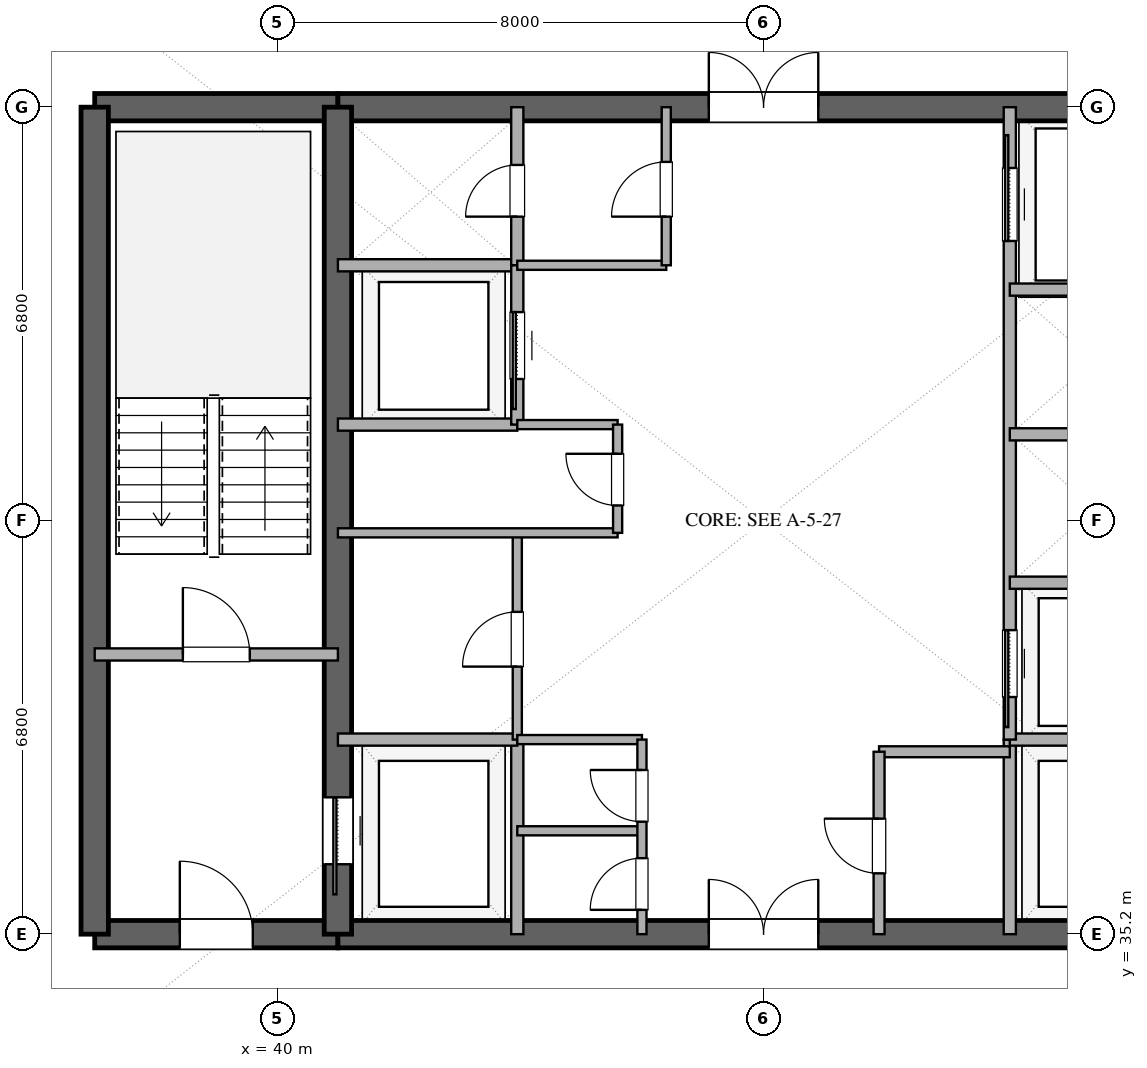
"""IFC4 building model, lengths in metres.
Left out: names, types, materials, properties, quantities, classifications, styles, units other than length and angle.
Written with IfcOpenShell. Run it as: python <this file> out.ifc"""

import sys

from ifc_helpers import new_model, si_unit, direction, frame, frame_2d, origin, place, context, subcontext, project, spatial, rectangle, extrude, element, fill, save


model = new_model("IFC4")
c1 = context("Model", 3, precision=1e-05, world=origin(), true_north=direction((0.0, 1.0)))
c2 = subcontext(c1, "Body", "Model", "MODEL_VIEW")
j1 = project(units=[si_unit("LENGTHUNIT", "METRE"), si_unit("PLANEANGLEUNIT", "RADIAN")], contexts=[c1])
p1 = place(None, origin())
s1 = spatial("IfcSite", under=j1, at=p1, CompositionType="ELEMENT")
p2 = place(p1, origin())
s2 = spatial("IfcBuilding", under=s1, at=p2, CompositionType="ELEMENT")
p3 = place(p2, frame((0.0, 0.0, 175.8)))
s3 = spatial("IfcBuildingStorey", under=s2, at=p3, CompositionType="ELEMENT", Elevation=175.8)
p4 = place(p3, frame((37.0, 35.2, 0.0), z_axis=(0.0, 0.0, 1.0), x_axis=(1.0, 0.0, 0.0)))
e1 = element("IfcWall", 1, at=p4, inside=s3, PredefinedType="SHEAR", context=c2, shape_type="SweptSolid", body=[
    extrude(rectangle(XDim=4.0, YDim=0.45, at=frame_2d((2.0, 0.0))), origin(), (0.0, 0.0, 1.0), 3.38),
])
p5 = place(p4, frame((1.4, 0.0, 0.0)))
e2 = element("IfcOpeningElement", 2, at=p5, cuts=e1, PredefinedType="OPENING", context=c2, shape_type="SweptSolid", body=[
    extrude(rectangle(XDim=1.2, YDim=2.15, at=frame_2d((0.6, 1.075))), frame((0.0, 0.235, 0.0), z_axis=(0.0, -1.0, 0.0), x_axis=(1.0, 0.0, 0.0)), (0.0, 0.0, 1.0), 0.47),
])
p6 = place(p3, frame((41.0, 35.2, 0.0), z_axis=(0.0, 0.0, 1.0), x_axis=(1.0, 0.0, 0.0)))
e3 = element("IfcWall", 3, at=p6, inside=s3, PredefinedType="SHEAR", context=c2, shape_type="SweptSolid", body=[
    extrude(rectangle(XDim=14.0, YDim=0.45, at=frame_2d((7.0, 0.0))), origin(), (0.0, 0.0, 1.0), 3.38),
])
p7 = place(p6, frame((6.1, 0.0, 0.0)))
e4 = element("IfcOpeningElement", 4, at=p7, cuts=e3, PredefinedType="OPENING", context=c2, shape_type="SweptSolid", body=[
    extrude(rectangle(XDim=1.8, YDim=2.25, at=frame_2d((0.9, 1.125))), frame((0.0, 0.235, 0.0), z_axis=(0.0, -1.0, 0.0), x_axis=(1.0, 0.0, 0.0)), (0.0, 0.0, 1.0), 0.47),
])
p8 = place(p3, frame((37.0, 48.8, 0.0), z_axis=(0.0, 0.0, 1.0), x_axis=(1.0, 0.0, 0.0)))
e5 = element("IfcWall", 5, at=p8, inside=s3, PredefinedType="SHEAR", context=c2, shape_type="SweptSolid", body=[
    extrude(rectangle(XDim=4.0, YDim=0.45, at=frame_2d((2.0, 0.0))), origin(), (0.0, 0.0, 1.0), 3.38),
])
p9 = place(p3, frame((41.0, 48.8, 0.0), z_axis=(0.0, 0.0, 1.0), x_axis=(1.0, 0.0, 0.0)))
e6 = element("IfcWall", 6, at=p9, inside=s3, PredefinedType="SHEAR", context=c2, shape_type="SweptSolid", body=[
    extrude(rectangle(XDim=14.0, YDim=0.45, at=frame_2d((7.0, 0.0))), origin(), (0.0, 0.0, 1.0), 3.38),
])
p10 = place(p9, frame((6.1, 0.0, 0.0)))
e7 = element("IfcOpeningElement", 7, at=p10, cuts=e6, PredefinedType="OPENING", context=c2, shape_type="SweptSolid", body=[
    extrude(rectangle(XDim=1.8, YDim=2.25, at=frame_2d((0.9, 1.125))), frame((0.0, 0.235, 0.0), z_axis=(0.0, -1.0, 0.0), x_axis=(1.0, 0.0, 0.0)), (0.0, 0.0, 1.0), 0.47),
])
p11 = place(p3, frame((37.0, 35.2, 0.0), z_axis=(0.0, 0.0, 1.0), x_axis=(0.0, 1.0, 0.0)))
e8 = element("IfcWall", 8, at=p11, inside=s3, PredefinedType="SHEAR", context=c2, shape_type="SweptSolid", body=[
    extrude(rectangle(XDim=13.6, YDim=0.45, at=frame_2d((6.8, 0.0))), origin(), (0.0, 0.0, 1.0), 3.38),
])
p12 = place(p3, frame((41.0, 35.2, 0.0), z_axis=(0.0, 0.0, 1.0), x_axis=(0.0, 1.0, 0.0)))
e9 = element("IfcWall", 9, at=p12, inside=s3, PredefinedType="SHEAR", context=c2, shape_type="SweptSolid", body=[
    extrude(rectangle(XDim=13.6, YDim=0.45, at=frame_2d((6.8, 0.0))), origin(), (0.0, 0.0, 1.0), 3.38),
])
p13 = place(p12, frame((1.15, 0.0, 0.0)))
e10 = element("IfcOpeningElement", 10, at=p13, cuts=e9, PredefinedType="OPENING", context=c2, shape_type="SweptSolid", body=[
    extrude(rectangle(XDim=1.1, YDim=2.2, at=frame_2d((0.55, 1.1))), frame((0.0, 0.235, 0.0), z_axis=(0.0, -1.0, 0.0), x_axis=(1.0, 0.0, 0.0)), (0.0, 0.0, 1.0), 0.47),
])
p14 = place(p3, frame((37.0, 39.8, 0.0), z_axis=(0.0, 0.0, 1.0), x_axis=(1.0, 0.0, 0.0)))
e11 = element("IfcWall", 11, at=p14, inside=s3, PredefinedType="SOLIDWALL", context=c2, shape_type="SweptSolid", body=[
    extrude(rectangle(XDim=4.0, YDim=0.2, at=frame_2d((2.0, 0.0))), origin(), (0.0, 0.0, 1.0), 2.74),
])
p15 = place(p14, frame((1.45, 0.0, 0.0)))
e12 = element("IfcOpeningElement", 12, at=p15, cuts=e11, PredefinedType="OPENING", context=c2, shape_type="SweptSolid", body=[
    extrude(rectangle(XDim=1.1, YDim=2.15, at=frame_2d((0.55, 1.075))), frame((0.0, 0.11, 0.0), z_axis=(0.0, -1.0, 0.0), x_axis=(1.0, 0.0, 0.0)), (0.0, 0.0, 1.0), 0.22),
])
p16 = place(p3, frame((43.95, 35.2, 0.0), z_axis=(0.0, 0.0, 1.0), x_axis=(0.0, 1.0, 0.0)))
e13 = element("IfcWall", 13, at=p16, inside=s3, PredefinedType="SOLIDWALL", context=c2, shape_type="SweptSolid", body=[
    extrude(rectangle(XDim=3.2, YDim=0.2, at=frame_2d((1.6, 0.0))), origin(), (0.0, 0.0, 1.0), 2.74),
])
p17 = place(p3, frame((41.0, 38.4, 0.0), z_axis=(0.0, 0.0, 1.0), x_axis=(1.0, 0.0, 0.0)))
e14 = element("IfcWall", 14, at=p17, inside=s3, PredefinedType="SOLIDWALL", context=c2, shape_type="SweptSolid", body=[
    extrude(rectangle(XDim=2.95, YDim=0.2, at=frame_2d((1.475, 0.0))), origin(), (0.0, 0.0, 1.0), 2.74),
])
p18 = place(p3, frame((52.05, 35.2, 0.0), z_axis=(0.0, 0.0, 1.0), x_axis=(0.0, 1.0, 0.0)))
e15 = element("IfcWall", 15, at=p18, inside=s3, PredefinedType="SOLIDWALL", context=c2, shape_type="SweptSolid", body=[
    extrude(rectangle(XDim=3.2, YDim=0.2, at=frame_2d((1.6, 0.0))), origin(), (0.0, 0.0, 1.0), 2.74),
])
for number, where, z_axis, x_axis in (
    (16, (52.05, 38.4, 0.0), (0.0, 0.0, 1.0), (1.0, 0.0, 0.0)),
    (17, (41.0, 46.2, 0.0), (0.0, 0.0, 1.0), (1.0, 0.0, 0.0)),
):
    element("IfcWall", number, at=place(p3, frame(where, z_axis=z_axis, x_axis=x_axis)), inside=s3, PredefinedType="SOLIDWALL", context=c2, shape_type="SweptSolid", body=[
        extrude(rectangle(XDim=2.95, YDim=0.2, at=frame_2d((1.475, 0.0))), origin(), (0.0, 0.0, 1.0), 2.74),
    ])
p19 = place(p3, frame((43.95, 46.2, 0.0), z_axis=(0.0, 0.0, 1.0), x_axis=(0.0, 1.0, 0.0)))
e18 = element("IfcWall", 18, at=p19, inside=s3, PredefinedType="SOLIDWALL", context=c2, shape_type="SweptSolid", body=[
    extrude(rectangle(XDim=2.6, YDim=0.2, at=frame_2d((1.3, 0.0))), origin(), (0.0, 0.0, 1.0), 2.74),
])
p20 = place(p19, frame((0.8, 0.0, 0.0)))
e19 = element("IfcOpeningElement", 19, at=p20, cuts=e18, PredefinedType="OPENING", context=c2, shape_type="SweptSolid", body=[
    extrude(rectangle(XDim=0.85, YDim=2.15, at=frame_2d((0.425, 1.075))), frame((0.0, 0.11, 0.0), z_axis=(0.0, -1.0, 0.0), x_axis=(1.0, 0.0, 0.0)), (0.0, 0.0, 1.0), 0.22),
])
p21 = place(p3, frame((41.0, 43.58, 0.0), z_axis=(0.0, 0.0, 1.0), x_axis=(1.0, 0.0, 0.0)))
e20 = element("IfcWall", 20, at=p21, inside=s3, PredefinedType="SOLIDWALL", context=c2, shape_type="SweptSolid", body=[
    extrude(rectangle(XDim=2.95, YDim=0.2, at=frame_2d((1.475, 0.0))), origin(), (0.0, 0.0, 1.0), 2.74),
])
p22 = place(p3, frame((43.95, 43.58, 0.0), z_axis=(0.0, 0.0, 1.0), x_axis=(0.0, 1.0, 0.0)))
e21 = element("IfcWall", 21, at=p22, inside=s3, PredefinedType="SOLIDWALL", context=c2, shape_type="SweptSolid", body=[
    extrude(rectangle(XDim=2.62, YDim=0.2, at=frame_2d((1.31, 0.0))), origin(), (0.0, 0.0, 1.0), 2.74),
])
p23 = place(p22, frame((0.75, 0.0, 0.0)))
e22 = element("IfcOpeningElement", 22, at=p23, cuts=e21, PredefinedType="OPENING", context=c2, shape_type="SweptSolid", body=[
    extrude(rectangle(XDim=1.1, YDim=2.2, at=frame_2d((0.55, 1.1))), frame((0.0, 0.11, 0.0), z_axis=(0.0, -1.0, 0.0), x_axis=(1.0, 0.0, 0.0)), (0.0, 0.0, 1.0), 0.22),
])
p24 = place(p3, frame((43.95, 38.4, 0.0), z_axis=(0.0, 0.0, 1.0), x_axis=(0.0, 1.0, 0.0)))
e23 = element("IfcWall", 23, at=p24, inside=s3, PredefinedType="PARTITIONING", context=c2, shape_type="SweptSolid", body=[
    extrude(rectangle(XDim=3.4, YDim=0.15, at=frame_2d((1.7, 0.0))), origin(), (0.0, 0.0, 1.0), 2.74),
])
p25 = place(p24, frame((1.2, 0.0, 0.0)))
e24 = element("IfcOpeningElement", 24, at=p25, cuts=e23, PredefinedType="OPENING", context=c2, shape_type="SweptSolid", body=[
    extrude(rectangle(XDim=0.9, YDim=2.15, at=frame_2d((0.45, 1.075))), frame((0.0, 0.085, 0.0), z_axis=(0.0, -1.0, 0.0), x_axis=(1.0, 0.0, 0.0)), (0.0, 0.0, 1.0), 0.17),
])
p26 = place(p3, frame((41.0, 41.8, 0.0), z_axis=(0.0, 0.0, 1.0), x_axis=(1.0, 0.0, 0.0)))
e25 = element("IfcWall", 25, at=p26, inside=s3, PredefinedType="PARTITIONING", context=c2, shape_type="SweptSolid", body=[
    extrude(rectangle(XDim=4.6, YDim=0.15, at=frame_2d((2.3, 0.0))), origin(), (0.0, 0.0, 1.0), 2.74),
])
p27 = place(p3, frame((43.95, 43.58, 0.0), z_axis=(0.0, 0.0, 1.0), x_axis=(1.0, 0.0, 0.0)))
e26 = element("IfcWall", 26, at=p27, inside=s3, PredefinedType="PARTITIONING", context=c2, shape_type="SweptSolid", body=[
    extrude(rectangle(XDim=1.65, YDim=0.15, at=frame_2d((0.825, 0.0))), origin(), (0.0, 0.0, 1.0), 2.74),
])
p28 = place(p3, frame((45.6, 41.8, 0.0), z_axis=(0.0, 0.0, 1.0), x_axis=(0.0, 1.0, 0.0)))
e27 = element("IfcWall", 27, at=p28, inside=s3, PredefinedType="PARTITIONING", context=c2, shape_type="SweptSolid", body=[
    extrude(rectangle(XDim=1.78, YDim=0.15, at=frame_2d((0.89, 0.0))), origin(), (0.0, 0.0, 1.0), 2.74),
])
p29 = place(p28, frame((0.45, 0.0, 0.0)))
e28 = element("IfcOpeningElement", 28, at=p29, cuts=e27, PredefinedType="OPENING", context=c2, shape_type="SweptSolid", body=[
    extrude(rectangle(XDim=0.85, YDim=2.15, at=frame_2d((0.425, 1.075))), frame((0.0, 0.085, 0.0), z_axis=(0.0, -1.0, 0.0), x_axis=(1.0, 0.0, 0.0)), (0.0, 0.0, 1.0), 0.17),
])
p30 = place(p3, frame((52.05, 38.4, 0.0), z_axis=(0.0, 0.0, 1.0), x_axis=(0.0, 1.0, 0.0)))
e29 = element("IfcWall", 29, at=p30, inside=s3, PredefinedType="SOLIDWALL", context=c2, shape_type="SweptSolid", body=[
    extrude(rectangle(XDim=10.4, YDim=0.2, at=frame_2d((5.2, 0.0))), origin(), (0.0, 0.0, 1.0), 2.74),
])
p31 = place(p30, frame((0.7, 0.0, 0.0)))
e30 = element("IfcOpeningElement", 30, at=p31, cuts=e29, PredefinedType="OPENING", context=c2, shape_type="SweptSolid", body=[
    extrude(rectangle(XDim=1.1, YDim=2.2, at=frame_2d((0.55, 1.1))), frame((0.0, 0.11, 0.0), z_axis=(0.0, -1.0, 0.0), x_axis=(1.0, 0.0, 0.0)), (0.0, 0.0, 1.0), 0.22),
])
p32 = place(p30, frame((8.2, 0.0, 0.0)))
e31 = element("IfcOpeningElement", 31, at=p32, cuts=e29, PredefinedType="OPENING", context=c2, shape_type="SweptSolid", body=[
    extrude(rectangle(XDim=1.2, YDim=2.2, at=frame_2d((0.6, 1.1))), frame((0.0, 0.11, 0.0), z_axis=(0.0, -1.0, 0.0), x_axis=(1.0, 0.0, 0.0)), (0.0, 0.0, 1.0), 0.22),
])
for number, where, z_axis, x_axis in (
    (32, (52.05, 40.98, 0.0), (0.0, 0.0, 1.0), (1.0, 0.0, 0.0)),
    (33, (52.05, 43.42, 0.0), (0.0, 0.0, 1.0), (1.0, 0.0, 0.0)),
    (34, (52.05, 45.8, 0.0), (0.0, 0.0, 1.0), (1.0, 0.0, 0.0)),
):
    element("IfcWall", number, at=place(p3, frame(where, z_axis=z_axis, x_axis=x_axis)), inside=s3, PredefinedType="SOLIDWALL", context=c2, shape_type="SweptSolid", body=[
        extrude(rectangle(XDim=2.95, YDim=0.2, at=frame_2d((1.475, 0.0))), origin(), (0.0, 0.0, 1.0), 2.74),
    ])
for number, where, z_axis, x_axis in (
    (35, (43.95, 36.9, 0.0), (0.0, 0.0, 1.0), (1.0, 0.0, 0.0)),
    (36, (43.95, 38.4, 0.0), (0.0, 0.0, 1.0), (1.0, 0.0, 0.0)),
):
    element("IfcWall", number, at=place(p3, frame(where, z_axis=z_axis, x_axis=x_axis)), inside=s3, PredefinedType="PARTITIONING", context=c2, shape_type="SweptSolid", body=[
        extrude(rectangle(XDim=2.05, YDim=0.15, at=frame_2d((1.025, 0.0))), origin(), (0.0, 0.0, 1.0), 2.74),
    ])
p33 = place(p3, frame((46.0, 35.2, 0.0), z_axis=(0.0, 0.0, 1.0), x_axis=(0.0, 1.0, 0.0)))
e37 = element("IfcWall", 37, at=p33, inside=s3, PredefinedType="PARTITIONING", context=c2, shape_type="SweptSolid", body=[
    extrude(rectangle(XDim=3.2, YDim=0.15, at=frame_2d((1.6, 0.0))), origin(), (0.0, 0.0, 1.0), 2.74),
])
p34 = place(p33, frame((0.4, 0.0, 0.0)))
e38 = element("IfcOpeningElement", 38, at=p34, cuts=e37, PredefinedType="OPENING", context=c2, shape_type="SweptSolid", body=[
    extrude(rectangle(XDim=0.85, YDim=2.15, at=frame_2d((0.425, 1.075))), frame((0.0, 0.085, 0.0), z_axis=(0.0, -1.0, 0.0), x_axis=(1.0, 0.0, 0.0)), (0.0, 0.0, 1.0), 0.17),
])
p35 = place(p33, frame((1.85, 0.0, 0.0)))
e39 = element("IfcOpeningElement", 39, at=p35, cuts=e37, PredefinedType="OPENING", context=c2, shape_type="SweptSolid", body=[
    extrude(rectangle(XDim=0.85, YDim=2.15, at=frame_2d((0.425, 1.075))), frame((0.0, 0.085, 0.0), z_axis=(0.0, -1.0, 0.0), x_axis=(1.0, 0.0, 0.0)), (0.0, 0.0, 1.0), 0.17),
])
p36 = place(p3, frame((43.95, 46.2, 0.0), z_axis=(0.0, 0.0, 1.0), x_axis=(1.0, 0.0, 0.0)))
e40 = element("IfcWall", 40, at=p36, inside=s3, PredefinedType="PARTITIONING", context=c2, shape_type="SweptSolid", body=[
    extrude(rectangle(XDim=2.45, YDim=0.15, at=frame_2d((1.225, 0.0))), origin(), (0.0, 0.0, 1.0), 2.74),
])
p37 = place(p3, frame((46.4, 46.2, 0.0), z_axis=(0.0, 0.0, 1.0), x_axis=(0.0, 1.0, 0.0)))
e41 = element("IfcWall", 41, at=p37, inside=s3, PredefinedType="PARTITIONING", context=c2, shape_type="SweptSolid", body=[
    extrude(rectangle(XDim=2.6, YDim=0.15, at=frame_2d((1.3, 0.0))), origin(), (0.0, 0.0, 1.0), 2.74),
])
p38 = place(p37, frame((0.8, 0.0, 0.0)))
e42 = element("IfcOpeningElement", 42, at=p38, cuts=e41, PredefinedType="OPENING", context=c2, shape_type="SweptSolid", body=[
    extrude(rectangle(XDim=0.9, YDim=2.15, at=frame_2d((0.45, 1.075))), frame((0.0, 0.085, 0.0), z_axis=(0.0, -1.0, 0.0), x_axis=(1.0, 0.0, 0.0)), (0.0, 0.0, 1.0), 0.17),
])
p39 = place(p3, frame((49.9, 38.2, 0.0), z_axis=(0.0, 0.0, 1.0), x_axis=(1.0, 0.0, 0.0)))
e43 = element("IfcWall", 43, at=p39, inside=s3, PredefinedType="PLUMBINGWALL", context=c2, shape_type="SweptSolid", body=[
    extrude(rectangle(XDim=2.15, YDim=0.18, at=frame_2d((1.075, 0.0))), origin(), (0.0, 0.0, 1.0), 2.74),
])
p40 = place(p3, frame((49.9, 35.2, 0.0), z_axis=(0.0, 0.0, 1.0), x_axis=(0.0, 1.0, 0.0)))
e44 = element("IfcWall", 44, at=p40, inside=s3, PredefinedType="PLUMBINGWALL", context=c2, shape_type="SweptSolid", body=[
    extrude(rectangle(XDim=3.0, YDim=0.18, at=frame_2d((1.5, 0.0))), origin(), (0.0, 0.0, 1.0), 2.74),
])
p41 = place(p40, frame((1.0, 0.0, 0.0)))
e45 = element("IfcOpeningElement", 45, at=p41, cuts=e44, PredefinedType="OPENING", context=c2, shape_type="SweptSolid", body=[
    extrude(rectangle(XDim=0.9, YDim=2.1, at=frame_2d((0.45, 1.05))), frame((0.0, 0.1, 0.0), z_axis=(0.0, -1.0, 0.0), x_axis=(1.0, 0.0, 0.0)), (0.0, 0.0, 1.0), 0.2),
])
p42 = place(p13, origin())
e46 = element("IfcDoor", 46, at=p42, inside=s3, OperationType="SLIDING_TO_LEFT", PredefinedType="DOOR", context=c2, shape_type="SweptSolid", body=[
    extrude(rectangle(XDim=1.1, YDim=2.2, at=frame_2d((0.55, 1.1))), frame((0.0, 0.025, 0.0), z_axis=(0.0, -1.0, 0.0), x_axis=(1.0, 0.0, 0.0)), (0.0, 0.0, 1.0), 0.05),
])
fill(e10, e46)
p43 = place(p5, origin())
e47 = element("IfcDoor", 47, at=p43, inside=s3, OperationType="SINGLE_SWING_LEFT", PredefinedType="DOOR", context=c2, shape_type="SweptSolid", body=[
    extrude(rectangle(XDim=1.2, YDim=2.15, at=frame_2d((0.6, 1.075))), frame((0.0, 0.025, 0.0), z_axis=(0.0, -1.0, 0.0), x_axis=(1.0, 0.0, 0.0)), (0.0, 0.0, 1.0), 0.05),
])
fill(e2, e47)
p44 = place(p7, origin())
e48 = element("IfcDoor", 48, at=p44, inside=s3, OperationType="DOUBLE_DOOR_SINGLE_SWING", PredefinedType="DOOR", context=c2, shape_type="SweptSolid", body=[
    extrude(rectangle(XDim=1.8, YDim=2.25, at=frame_2d((0.9, 1.125))), frame((0.0, 0.025, 0.0), z_axis=(0.0, -1.0, 0.0), x_axis=(1.0, 0.0, 0.0)), (0.0, 0.0, 1.0), 0.05),
])
fill(e4, e48)
p45 = place(p10, origin())
e49 = element("IfcDoor", 49, at=p45, inside=s3, OperationType="DOUBLE_DOOR_SINGLE_SWING", PredefinedType="DOOR", context=c2, shape_type="SweptSolid", body=[
    extrude(rectangle(XDim=1.8, YDim=2.25, at=frame_2d((0.9, 1.125))), frame((0.0, 0.025, 0.0), z_axis=(0.0, -1.0, 0.0), x_axis=(1.0, 0.0, 0.0)), (0.0, 0.0, 1.0), 0.05),
])
fill(e7, e49)
p46 = place(p15, origin())
e50 = element("IfcDoor", 50, at=p46, inside=s3, OperationType="SINGLE_SWING_LEFT", PredefinedType="DOOR", context=c2, shape_type="SweptSolid", body=[
    extrude(rectangle(XDim=1.1, YDim=2.15, at=frame_2d((0.55, 1.075))), frame((0.0, 0.025, 0.0), z_axis=(0.0, -1.0, 0.0), x_axis=(1.0, 0.0, 0.0)), (0.0, 0.0, 1.0), 0.05),
])
fill(e12, e50)
p47 = place(p20, origin())
e51 = element("IfcDoor", 51, at=p47, inside=s3, OperationType="SINGLE_SWING_LEFT", PredefinedType="DOOR", context=c2, shape_type="SweptSolid", body=[
    extrude(rectangle(XDim=0.85, YDim=2.15, at=frame_2d((0.425, 1.075))), frame((0.0, 0.025, 0.0), z_axis=(0.0, -1.0, 0.0), x_axis=(1.0, 0.0, 0.0)), (0.0, 0.0, 1.0), 0.05),
])
fill(e19, e51)
p48 = place(p23, origin())
e52 = element("IfcDoor", 52, at=p48, inside=s3, OperationType="SLIDING_TO_LEFT", PredefinedType="DOOR", context=c2, shape_type="SweptSolid", body=[
    extrude(rectangle(XDim=1.1, YDim=2.2, at=frame_2d((0.55, 1.1))), frame((0.0, 0.025, 0.0), z_axis=(0.0, -1.0, 0.0), x_axis=(1.0, 0.0, 0.0)), (0.0, 0.0, 1.0), 0.05),
])
fill(e22, e52)
p49 = place(p25, origin())
e53 = element("IfcDoor", 53, at=p49, inside=s3, OperationType="SINGLE_SWING_LEFT", PredefinedType="DOOR", context=c2, shape_type="SweptSolid", body=[
    extrude(rectangle(XDim=0.9, YDim=2.15, at=frame_2d((0.45, 1.075))), frame((0.0, 0.025, 0.0), z_axis=(0.0, -1.0, 0.0), x_axis=(1.0, 0.0, 0.0)), (0.0, 0.0, 1.0), 0.05),
])
fill(e24, e53)
p50 = place(p29, origin())
e54 = element("IfcDoor", 54, at=p50, inside=s3, OperationType="SINGLE_SWING_RIGHT", PredefinedType="DOOR", context=c2, shape_type="SweptSolid", body=[
    extrude(rectangle(XDim=0.85, YDim=2.15, at=frame_2d((0.425, 1.075))), frame((0.0, 0.025, 0.0), z_axis=(0.0, -1.0, 0.0), x_axis=(1.0, 0.0, 0.0)), (0.0, 0.0, 1.0), 0.05),
])
fill(e28, e54)
p51 = place(p31, origin())
e55 = element("IfcDoor", 55, at=p51, inside=s3, OperationType="SLIDING_TO_LEFT", PredefinedType="DOOR", context=c2, shape_type="SweptSolid", body=[
    extrude(rectangle(XDim=1.1, YDim=2.2, at=frame_2d((0.55, 1.1))), frame((0.0, 0.025, 0.0), z_axis=(0.0, -1.0, 0.0), x_axis=(1.0, 0.0, 0.0)), (0.0, 0.0, 1.0), 0.05),
])
fill(e30, e55)
p52 = place(p32, origin())
e56 = element("IfcDoor", 56, at=p52, inside=s3, OperationType="SLIDING_TO_RIGHT", PredefinedType="DOOR", context=c2, shape_type="SweptSolid", body=[
    extrude(rectangle(XDim=1.2, YDim=2.2, at=frame_2d((0.6, 1.1))), frame((0.0, 0.025, 0.0), z_axis=(0.0, -1.0, 0.0), x_axis=(1.0, 0.0, 0.0)), (0.0, 0.0, 1.0), 0.05),
])
fill(e31, e56)
p53 = place(p34, origin())
e57 = element("IfcDoor", 57, at=p53, inside=s3, OperationType="SINGLE_SWING_LEFT", PredefinedType="DOOR", context=c2, shape_type="SweptSolid", body=[
    extrude(rectangle(XDim=0.85, YDim=2.15, at=frame_2d((0.425, 1.075))), frame((0.0, 0.025, 0.0), z_axis=(0.0, -1.0, 0.0), x_axis=(1.0, 0.0, 0.0)), (0.0, 0.0, 1.0), 0.05),
])
fill(e38, e57)
p54 = place(p35, origin())
e58 = element("IfcDoor", 58, at=p54, inside=s3, OperationType="SINGLE_SWING_RIGHT", PredefinedType="DOOR", context=c2, shape_type="SweptSolid", body=[
    extrude(rectangle(XDim=0.85, YDim=2.15, at=frame_2d((0.425, 1.075))), frame((0.0, 0.025, 0.0), z_axis=(0.0, -1.0, 0.0), x_axis=(1.0, 0.0, 0.0)), (0.0, 0.0, 1.0), 0.05),
])
fill(e39, e58)
p55 = place(p38, origin())
e59 = element("IfcDoor", 59, at=p55, inside=s3, OperationType="SINGLE_SWING_LEFT", PredefinedType="DOOR", context=c2, shape_type="SweptSolid", body=[
    extrude(rectangle(XDim=0.9, YDim=2.15, at=frame_2d((0.45, 1.075))), frame((0.0, 0.025, 0.0), z_axis=(0.0, -1.0, 0.0), x_axis=(1.0, 0.0, 0.0)), (0.0, 0.0, 1.0), 0.05),
])
fill(e42, e59)
p56 = place(p41, origin())
e60 = element("IfcDoor", 60, at=p56, inside=s3, OperationType="SINGLE_SWING_RIGHT", PredefinedType="DOOR", context=c2, shape_type="SweptSolid", body=[
    extrude(rectangle(XDim=0.9, YDim=2.1, at=frame_2d((0.45, 1.05))), frame((0.0, 0.025, 0.0), z_axis=(0.0, -1.0, 0.0), x_axis=(1.0, 0.0, 0.0)), (0.0, 0.0, 1.0), 0.05),
])
fill(e45, e60)
save(model, sys.argv[1])
